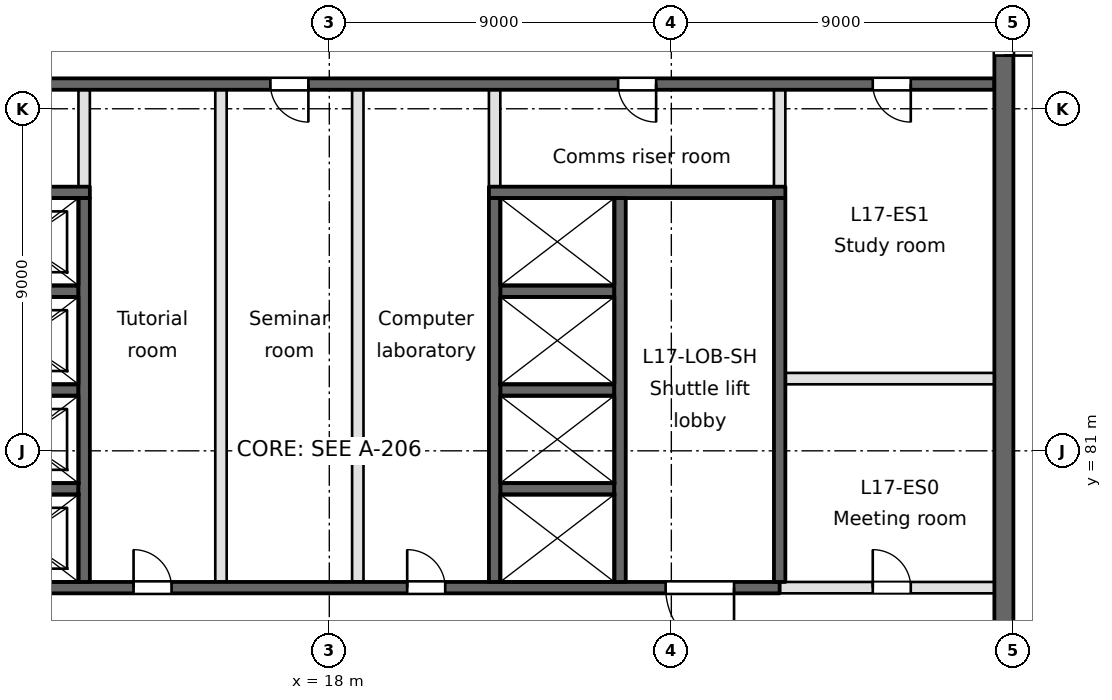
"""IFC4 building model, lengths in metres.
Left out: names, types, materials, properties, quantities, classifications, styles, units other than length and angle.
Written with IfcOpenShell. Run it as: python <this file> out.ifc"""

import sys

from ifc_helpers import new_model, si_unit, direction, frame, frame_2d, origin, place, context, subcontext, project, spatial, rectangle, extrude, element, fill, save


model = new_model("IFC4")
c1 = context("Model", 3, precision=1e-05, world=origin(), true_north=direction((0.0, 1.0)))
c2 = subcontext(c1, "Body", "Model", "MODEL_VIEW")
j1 = project(units=[si_unit("LENGTHUNIT", "METRE"), si_unit("PLANEANGLEUNIT", "RADIAN")], contexts=[c1])
p1 = place(None, origin())
s1 = spatial("IfcSite", under=j1, at=p1, CompositionType="ELEMENT")
p2 = place(p1, origin())
s2 = spatial("IfcBuilding", under=s1, at=p2, CompositionType="ELEMENT")
p3 = place(p2, frame((0.0, 0.0, 72.8)))
s3 = spatial("IfcBuildingStorey", under=s2, at=p3, CompositionType="ELEMENT", Elevation=72.8)
p4 = place(p3, frame((0.9, 77.4, -0.4), z_axis=(0.0, 0.0, 1.0), x_axis=(1.0, 0.0, 0.0)))
e1 = element("IfcWall", 1, at=p4, inside=s3, PredefinedType="SOLIDWALL", context=c2, shape_type="SweptSolid", body=[
    extrude(rectangle(XDim=28.95, YDim=0.3, at=frame_2d((14.475, 0.0))), origin(), (0.0, 0.0, 1.0), 3.7),
])
p5 = place(p4, frame((4.35, 0.0, 0.4)))
e2 = element("IfcOpeningElement", 2, at=p5, cuts=e1, PredefinedType="OPENING", context=c2, shape_type="SweptSolid", body=[
    extrude(rectangle(XDim=1.8, YDim=2.1, at=frame_2d((0.9, 1.05))), frame((0.0, 0.15, 0.0), z_axis=(0.0, -1.0, 0.0), x_axis=(1.0, 0.0, 0.0)), (0.0, 0.0, 1.0), 0.3),
])
p6 = place(p4, frame((25.95, 0.0, 0.4)))
e3 = element("IfcOpeningElement", 3, at=p6, cuts=e1, PredefinedType="OPENING", context=c2, shape_type="SweptSolid", body=[
    extrude(rectangle(XDim=1.8, YDim=2.1, at=frame_2d((0.9, 1.05))), frame((0.0, 0.15, 0.0), z_axis=(0.0, -1.0, 0.0), x_axis=(1.0, 0.0, 0.0)), (0.0, 0.0, 1.0), 0.3),
])
p7 = place(p4, frame((11.95, 0.0, 0.4)))
e4 = element("IfcOpeningElement", 4, at=p7, cuts=e1, PredefinedType="OPENING", context=c2, shape_type="SweptSolid", body=[
    extrude(rectangle(XDim=1.0, YDim=2.1, at=frame_2d((0.5, 1.05))), frame((0.0, 0.15, 0.0), z_axis=(0.0, -1.0, 0.0), x_axis=(1.0, 0.0, 0.0)), (0.0, 0.0, 1.0), 0.3),
])
p8 = place(p4, frame((19.15, 0.0, 0.4)))
e5 = element("IfcOpeningElement", 5, at=p8, cuts=e1, PredefinedType="OPENING", context=c2, shape_type="SweptSolid", body=[
    extrude(rectangle(XDim=1.0, YDim=2.1, at=frame_2d((0.5, 1.05))), frame((0.0, 0.15, 0.0), z_axis=(0.0, -1.0, 0.0), x_axis=(1.0, 0.0, 0.0)), (0.0, 0.0, 1.0), 0.3),
])
p9 = place(p3, frame((29.85, 77.4, 0.0), z_axis=(0.0, 0.0, 1.0), x_axis=(1.0, 0.0, 0.0)))
e6 = element("IfcWall", 6, at=p9, inside=s3, PredefinedType="PARTITIONING", context=c2, shape_type="SweptSolid", body=[
    extrude(rectangle(XDim=5.65, YDim=0.3, at=frame_2d((2.825, 0.0))), origin(), (0.0, 0.0, 1.0), 3.3),
])
p10 = place(p9, frame((2.45, 0.0, 0.0)))
e7 = element("IfcOpeningElement", 7, at=p10, cuts=e6, PredefinedType="OPENING", context=c2, shape_type="SweptSolid", body=[
    extrude(rectangle(XDim=1.0, YDim=2.1, at=frame_2d((0.5, 1.05))), frame((0.0, 0.15, 0.0), z_axis=(0.0, -1.0, 0.0), x_axis=(1.0, 0.0, 0.0)), (0.0, 0.0, 1.0), 0.3),
])
for number, where, z_axis, x_axis in (
    (8, (8.4, 80.0, -0.4), (0.0, 0.0, 1.0), (1.0, 0.0, 0.0)),
    (9, (22.5, 80.0, -0.4), (0.0, 0.0, 1.0), (1.0, 0.0, 0.0)),
    (10, (8.4, 82.6, -0.4), (0.0, 0.0, 1.0), (1.0, 0.0, 0.0)),
    (11, (22.5, 82.6, -0.4), (0.0, 0.0, 1.0), (1.0, 0.0, 0.0)),
):
    element("IfcWall", number, at=place(p3, frame(where, z_axis=z_axis, x_axis=x_axis)), inside=s3, PredefinedType="SOLIDWALL", context=c2, shape_type="SweptSolid", body=[
        extrude(rectangle(XDim=3.0, YDim=0.3, at=frame_2d((1.5, 0.0))), origin(), (0.0, 0.0, 1.0), 3.7),
    ])
p11 = place(p3, frame((30.0, 82.9, 0.0), z_axis=(0.0, 0.0, 1.0), x_axis=(1.0, 0.0, 0.0)))
e12 = element("IfcWall", 12, at=p11, inside=s3, PredefinedType="PARTITIONING", context=c2, shape_type="SweptSolid", body=[
    extrude(rectangle(XDim=5.5, YDim=0.3, at=frame_2d((2.75, 0.0))), origin(), (0.0, 0.0, 1.0), 3.3),
])
for number, where, z_axis, x_axis in (
    (13, (8.4, 85.2, -0.4), (0.0, 0.0, 1.0), (1.0, 0.0, 0.0)),
    (14, (22.5, 85.2, -0.4), (0.0, 0.0, 1.0), (1.0, 0.0, 0.0)),
):
    element("IfcWall", number, at=place(p3, frame(where, z_axis=z_axis, x_axis=x_axis)), inside=s3, PredefinedType="SOLIDWALL", context=c2, shape_type="SweptSolid", body=[
        extrude(rectangle(XDim=3.0, YDim=0.3, at=frame_2d((1.5, 0.0))), origin(), (0.0, 0.0, 1.0), 3.7),
    ])
p12 = place(p3, frame((0.9, 87.8, -0.4), z_axis=(0.0, 0.0, 1.0), x_axis=(1.0, 0.0, 0.0)))
e15 = element("IfcWall", 15, at=p12, inside=s3, PredefinedType="SOLIDWALL", context=c2, shape_type="SweptSolid", body=[
    extrude(rectangle(XDim=10.8, YDim=0.3, at=frame_2d((5.4, 0.0))), origin(), (0.0, 0.0, 1.0), 3.7),
])
p13 = place(p3, frame((22.2, 87.8, -0.4), z_axis=(0.0, 0.0, 1.0), x_axis=(1.0, 0.0, 0.0)))
e16 = element("IfcWall", 16, at=p13, inside=s3, PredefinedType="SOLIDWALL", context=c2, shape_type="SweptSolid", body=[
    extrude(rectangle(XDim=7.8, YDim=0.3, at=frame_2d((3.9, 0.0))), origin(), (0.0, 0.0, 1.0), 3.7),
])
p14 = place(p3, frame((0.9, 90.65, -0.4), z_axis=(0.0, 0.0, 1.0), x_axis=(1.0, 0.0, 0.0)))
e17 = element("IfcWall", 17, at=p14, inside=s3, PredefinedType="SOLIDWALL", context=c2, shape_type="SweptSolid", body=[
    extrude(rectangle(XDim=34.6, YDim=0.3, at=frame_2d((17.3, 0.0))), origin(), (0.0, 0.0, 1.0), 3.7),
])
p15 = place(p14, frame((4.75, 0.0, 0.4)))
e18 = element("IfcOpeningElement", 18, at=p15, cuts=e17, PredefinedType="OPENING", context=c2, shape_type="SweptSolid", body=[
    extrude(rectangle(XDim=1.0, YDim=2.1, at=frame_2d((0.5, 1.05))), frame((0.0, 0.15, 0.0), z_axis=(0.0, -1.0, 0.0), x_axis=(1.0, 0.0, 0.0)), (0.0, 0.0, 1.0), 0.3),
])
p16 = place(p14, frame((24.7, 0.0, 0.4)))
e19 = element("IfcOpeningElement", 19, at=p16, cuts=e17, PredefinedType="OPENING", context=c2, shape_type="SweptSolid", body=[
    extrude(rectangle(XDim=1.0, YDim=2.1, at=frame_2d((0.5, 1.05))), frame((0.0, 0.15, 0.0), z_axis=(0.0, -1.0, 0.0), x_axis=(1.0, 0.0, 0.0)), (0.0, 0.0, 1.0), 0.3),
])
p17 = place(p14, frame((15.55, 0.0, 0.4)))
e20 = element("IfcOpeningElement", 20, at=p17, cuts=e17, PredefinedType="OPENING", context=c2, shape_type="SweptSolid", body=[
    extrude(rectangle(XDim=1.0, YDim=2.1, at=frame_2d((0.5, 1.05))), frame((0.0, 0.15, 0.0), z_axis=(0.0, -1.0, 0.0), x_axis=(1.0, 0.0, 0.0)), (0.0, 0.0, 1.0), 0.3),
])
p18 = place(p14, frame((31.4, 0.0, 0.4)))
e21 = element("IfcOpeningElement", 21, at=p18, cuts=e17, PredefinedType="OPENING", context=c2, shape_type="SweptSolid", body=[
    extrude(rectangle(XDim=1.0, YDim=2.1, at=frame_2d((0.5, 1.05))), frame((0.0, 0.15, 0.0), z_axis=(0.0, -1.0, 0.0), x_axis=(1.0, 0.0, 0.0)), (0.0, 0.0, 1.0), 0.3),
])
p19 = place(p3, frame((11.55, 77.55, -0.4), z_axis=(0.0, 0.0, 1.0), x_axis=(0.0, 1.0, 0.0)))
e22 = element("IfcWall", 22, at=p19, inside=s3, PredefinedType="SOLIDWALL", context=c2, shape_type="SweptSolid", body=[
    extrude(rectangle(XDim=10.1, YDim=0.3, at=frame_2d((5.05, 0.0))), origin(), (0.0, 0.0, 1.0), 3.7),
])
p20 = place(p3, frame((11.55, 87.95, 0.0), z_axis=(0.0, 0.0, 1.0), x_axis=(0.0, 1.0, 0.0)))
e23 = element("IfcWall", 23, at=p20, inside=s3, PredefinedType="PARTITIONING", context=c2, shape_type="SweptSolid", body=[
    extrude(rectangle(XDim=2.55, YDim=0.3, at=frame_2d((1.275, 0.0))), origin(), (0.0, 0.0, 1.0), 3.3),
])
for number, where, z_axis, x_axis in (
    (24, (15.15, 77.55, 0.0), (0.0, 0.0, 1.0), (0.0, 1.0, 0.0)),
    (25, (18.75, 77.55, 0.0), (0.0, 0.0, 1.0), (0.0, 1.0, 0.0)),
):
    element("IfcWall", number, at=place(p3, frame(where, z_axis=z_axis, x_axis=x_axis)), inside=s3, PredefinedType="PARTITIONING", context=c2, shape_type="SweptSolid", body=[
        extrude(rectangle(XDim=12.95, YDim=0.3, at=frame_2d((6.475, 0.0))), origin(), (0.0, 0.0, 1.0), 3.3),
    ])
p21 = place(p3, frame((22.35, 77.55, -0.4), z_axis=(0.0, 0.0, 1.0), x_axis=(0.0, 1.0, 0.0)))
e26 = element("IfcWall", 26, at=p21, inside=s3, PredefinedType="SOLIDWALL", context=c2, shape_type="SweptSolid", body=[
    extrude(rectangle(XDim=10.1, YDim=0.3, at=frame_2d((5.05, 0.0))), origin(), (0.0, 0.0, 1.0), 3.7),
])
p22 = place(p3, frame((22.35, 87.95, 0.0), z_axis=(0.0, 0.0, 1.0), x_axis=(0.0, 1.0, 0.0)))
e27 = element("IfcWall", 27, at=p22, inside=s3, PredefinedType="PARTITIONING", context=c2, shape_type="SweptSolid", body=[
    extrude(rectangle(XDim=2.55, YDim=0.3, at=frame_2d((1.275, 0.0))), origin(), (0.0, 0.0, 1.0), 3.3),
])
for number, where, z_axis, x_axis in (
    (28, (25.65, 77.55, -0.4), (0.0, 0.0, 1.0), (0.0, 1.0, 0.0)),
    (29, (29.85, 77.55, -0.4), (0.0, 0.0, 1.0), (0.0, 1.0, 0.0)),
):
    element("IfcWall", number, at=place(p3, frame(where, z_axis=z_axis, x_axis=x_axis)), inside=s3, PredefinedType="SOLIDWALL", context=c2, shape_type="SweptSolid", body=[
        extrude(rectangle(XDim=10.1, YDim=0.3, at=frame_2d((5.05, 0.0))), origin(), (0.0, 0.0, 1.0), 3.7),
    ])
p23 = place(p3, frame((29.85, 87.95, 0.0), z_axis=(0.0, 0.0, 1.0), x_axis=(0.0, 1.0, 0.0)))
e30 = element("IfcWall", 30, at=p23, inside=s3, PredefinedType="PARTITIONING", context=c2, shape_type="SweptSolid", body=[
    extrude(rectangle(XDim=2.55, YDim=0.3, at=frame_2d((1.275, 0.0))), origin(), (0.0, 0.0, 1.0), 3.3),
])
p24 = place(p3, frame((35.75, 63.5, -0.4), z_axis=(0.0, 0.0, 1.0), x_axis=(0.0, 1.0, 0.0)))
e31 = element("IfcWall", 31, at=p24, inside=s3, PredefinedType="SOLIDWALL", context=c2, shape_type="SweptSolid", body=[
    extrude(rectangle(XDim=34.6, YDim=0.5, at=frame_2d((17.3, 0.0))), origin(), (0.0, 0.0, 1.0), 3.7),
])
p25 = place(p24, frame((9.7, 0.0, 0.4)))
e32 = element("IfcOpeningElement", 32, at=p25, cuts=e31, PredefinedType="OPENING", context=c2, shape_type="SweptSolid", body=[
    extrude(rectangle(XDim=2.4, YDim=2.1, at=frame_2d((1.2, 1.05))), frame((0.0, 0.25, 0.0), z_axis=(0.0, -1.0, 0.0), x_axis=(1.0, 0.0, 0.0)), (0.0, 0.0, 1.0), 0.5),
])
p26 = place(p24, frame((27.9, 0.0, 0.4)))
e33 = element("IfcOpeningElement", 33, at=p26, cuts=e31, PredefinedType="OPENING", context=c2, shape_type="SweptSolid", body=[
    extrude(rectangle(XDim=1.5, YDim=2.1, at=frame_2d((0.75, 1.05))), frame((0.0, 0.25, 0.0), z_axis=(0.0, -1.0, 0.0), x_axis=(1.0, 0.0, 0.0)), (0.0, 0.0, 1.0), 0.5),
])
p27 = place(p24, frame((1.5, 0.0, 0.4)))
e34 = element("IfcOpeningElement", 34, at=p27, cuts=e31, PredefinedType="OPENING", context=c2, shape_type="SweptSolid", body=[
    extrude(rectangle(XDim=1.2, YDim=2.1, at=frame_2d((0.6, 1.05))), frame((0.0, 0.25, 0.0), z_axis=(0.0, -1.0, 0.0), x_axis=(1.0, 0.0, 0.0)), (0.0, 0.0, 1.0), 0.5),
])
p28 = place(p6, frame((1.8, 0.0, 0.0), z_axis=(0.0, 0.0, 1.0), x_axis=(-1.0, 0.0, 0.0)))
e35 = element("IfcDoor", 35, at=p28, inside=s3, OperationType="SINGLE_SWING_LEFT", PredefinedType="DOOR", context=c2, shape_type="SweptSolid", body=[
    extrude(rectangle(XDim=1.8, YDim=2.1, at=frame_2d((0.9, 1.05))), frame((0.0, 0.025, 0.0), z_axis=(0.0, -1.0, 0.0), x_axis=(1.0, 0.0, 0.0)), (0.0, 0.0, 1.0), 0.05),
])
fill(e3, e35)
p29 = place(p26, frame((1.5, 0.0, 0.0), z_axis=(0.0, 0.0, 1.0), x_axis=(-1.0, 0.0, 0.0)))
e36 = element("IfcDoor", 36, at=p29, inside=s3, OperationType="SINGLE_SWING_RIGHT", PredefinedType="DOOR", context=c2, shape_type="SweptSolid", body=[
    extrude(rectangle(XDim=1.5, YDim=2.1, at=frame_2d((0.75, 1.05))), frame((0.0, 0.025, 0.0), z_axis=(0.0, -1.0, 0.0), x_axis=(1.0, 0.0, 0.0)), (0.0, 0.0, 1.0), 0.05),
])
fill(e33, e36)
p30 = place(p16, frame((1.0, 0.0, 0.0), z_axis=(0.0, 0.0, 1.0), x_axis=(-1.0, 0.0, 0.0)))
e37 = element("IfcDoor", 37, at=p30, inside=s3, OperationType="SINGLE_SWING_LEFT", PredefinedType="DOOR", context=c2, shape_type="SweptSolid", body=[
    extrude(rectangle(XDim=1.0, YDim=2.1, at=frame_2d((0.5, 1.05))), frame((0.0, 0.025, 0.0), z_axis=(0.0, -1.0, 0.0), x_axis=(1.0, 0.0, 0.0)), (0.0, 0.0, 1.0), 0.05),
])
fill(e19, e37)
p31 = place(p7, origin())
e38 = element("IfcDoor", 38, at=p31, inside=s3, OperationType="SINGLE_SWING_LEFT", PredefinedType="DOOR", context=c2, shape_type="SweptSolid", body=[
    extrude(rectangle(XDim=1.0, YDim=2.1, at=frame_2d((0.5, 1.05))), frame((0.0, 0.025, 0.0), z_axis=(0.0, -1.0, 0.0), x_axis=(1.0, 0.0, 0.0)), (0.0, 0.0, 1.0), 0.05),
])
fill(e4, e38)
p32 = place(p17, frame((1.0, 0.0, 0.0), z_axis=(0.0, 0.0, 1.0), x_axis=(-1.0, 0.0, 0.0)))
e39 = element("IfcDoor", 39, at=p32, inside=s3, OperationType="SINGLE_SWING_LEFT", PredefinedType="DOOR", context=c2, shape_type="SweptSolid", body=[
    extrude(rectangle(XDim=1.0, YDim=2.1, at=frame_2d((0.5, 1.05))), frame((0.0, 0.025, 0.0), z_axis=(0.0, -1.0, 0.0), x_axis=(1.0, 0.0, 0.0)), (0.0, 0.0, 1.0), 0.05),
])
fill(e20, e39)
p33 = place(p8, origin())
e40 = element("IfcDoor", 40, at=p33, inside=s3, OperationType="SINGLE_SWING_LEFT", PredefinedType="DOOR", context=c2, shape_type="SweptSolid", body=[
    extrude(rectangle(XDim=1.0, YDim=2.1, at=frame_2d((0.5, 1.05))), frame((0.0, 0.025, 0.0), z_axis=(0.0, -1.0, 0.0), x_axis=(1.0, 0.0, 0.0)), (0.0, 0.0, 1.0), 0.05),
])
fill(e5, e40)
p34 = place(p10, origin())
e41 = element("IfcDoor", 41, at=p34, inside=s3, OperationType="SINGLE_SWING_LEFT", PredefinedType="DOOR", context=c2, shape_type="SweptSolid", body=[
    extrude(rectangle(XDim=1.0, YDim=2.1, at=frame_2d((0.5, 1.05))), frame((0.0, 0.025, 0.0), z_axis=(0.0, -1.0, 0.0), x_axis=(1.0, 0.0, 0.0)), (0.0, 0.0, 1.0), 0.05),
])
fill(e7, e41)
p35 = place(p18, frame((1.0, 0.0, 0.0), z_axis=(0.0, 0.0, 1.0), x_axis=(-1.0, 0.0, 0.0)))
e42 = element("IfcDoor", 42, at=p35, inside=s3, OperationType="SINGLE_SWING_LEFT", PredefinedType="DOOR", context=c2, shape_type="SweptSolid", body=[
    extrude(rectangle(XDim=1.0, YDim=2.1, at=frame_2d((0.5, 1.05))), frame((0.0, 0.025, 0.0), z_axis=(0.0, -1.0, 0.0), x_axis=(1.0, 0.0, 0.0)), (0.0, 0.0, 1.0), 0.05),
])
fill(e21, e42)
save(model, sys.argv[1])
